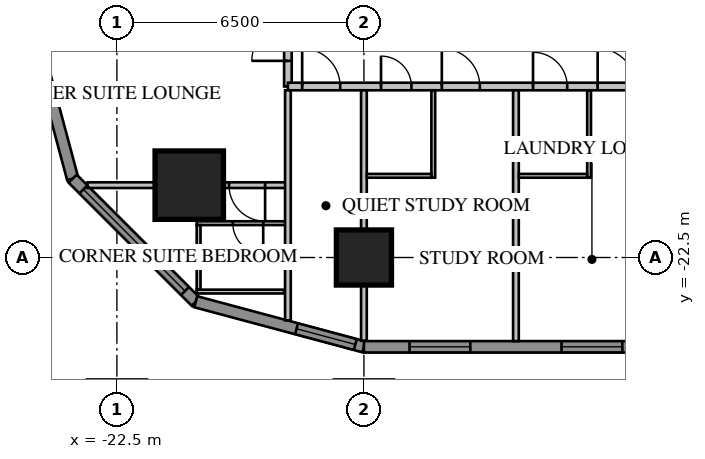
"""IFC4 building model, lengths in metres.
Left out: names, types, materials, properties, quantities, classifications, styles, units other than length and angle.
Written with IfcOpenShell. Run it as: python <this file> out.ifc"""

import sys

from ifc_helpers import new_model, si_unit, direction, frame, frame_2d, origin, origin_2d, place, context, subcontext, project, spatial, rectangle, extrude, element, fill, save


model = new_model("IFC4")
c1 = context("Model", 3, precision=1e-05, world=origin(), true_north=direction((0.0, 1.0)))
c2 = subcontext(c1, "Body", "Model", "MODEL_VIEW")
j1 = project(units=[si_unit("LENGTHUNIT", "METRE"), si_unit("PLANEANGLEUNIT", "RADIAN")], contexts=[c1])
p1 = place(None, origin())
s1 = spatial("IfcSite", under=j1, at=p1, CompositionType="ELEMENT")
p2 = place(p1, origin())
s2 = spatial("IfcBuilding", under=s1, at=p2, CompositionType="ELEMENT")
p3 = place(p2, frame((0.0, 0.0, 46.8)))
s3 = spatial("IfcBuildingStorey", under=s2, at=p3, CompositionType="ELEMENT", Elevation=46.8)
p4 = place(p3, frame((-20.596, -20.596, 0.0), z_axis=(0.0, 0.0, 1.0), x_axis=(1.0, 0.0, 0.0)))
e1 = element("IfcColumn", 1, at=p4, inside=s3, PredefinedType="COLUMN", context=c2, shape_type="SweptSolid", body=[
    extrude(rectangle(XDim=1.8, YDim=1.8, at=origin_2d()), origin(), (0.0, 0.0, 1.0), 3.85),
])
p5 = place(p3, frame((-16.0, -22.5, 0.0), z_axis=(0.0, 0.0, 1.0), x_axis=(1.0, 0.0, 0.0)))
e2 = element("IfcColumn", 2, at=p5, inside=s3, PredefinedType="COLUMN", context=c2, shape_type="SweptSolid", body=[
    extrude(rectangle(XDim=1.45, YDim=1.45, at=origin_2d()), origin(), (0.0, 0.0, 1.0), 3.85),
])
p6 = place(p3, frame((-24.85, -16.0, 0.0), z_axis=(0.0, 0.0, 1.0), x_axis=(0.258839972501, -0.965920218567, 0.0)))
e3 = element("IfcWall", 3, at=p6, inside=s3, PredefinedType="SOLIDWALL", context=c2, shape_type="SweptSolid", body=[
    extrude(rectangle(XDim=4.581, YDim=0.3, at=frame_2d((2.291, 0.0))), origin(), (0.0, 0.0, 1.0), 3.65),
])
p7 = place(p3, frame((-23.664, -20.425, 0.0), z_axis=(0.0, 0.0, 1.0), x_axis=(0.707106781187, -0.707106781187, 0.0)))
e4 = element("IfcWall", 4, at=p7, inside=s3, PredefinedType="SOLIDWALL", context=c2, shape_type="SweptSolid", body=[
    extrude(rectangle(XDim=4.581, YDim=0.3, at=frame_2d((2.291, 0.0))), origin(), (0.0, 0.0, 1.0), 3.65),
])
p8 = place(p7, frame((0.4, 0.0, 0.75)))
e5 = element("IfcOpeningElement", 5, at=p8, cuts=e4, PredefinedType="OPENING", context=c2, shape_type="SweptSolid", body=[
    extrude(rectangle(XDim=3.781, YDim=1.8, at=frame_2d((1.891, 0.9))), frame((0.0, 0.17, 0.0), z_axis=(0.0, -1.0, 0.0), x_axis=(1.0, 0.0, 0.0)), (0.0, 0.0, 1.0), 0.34),
])
p9 = place(p3, frame((-20.425, -23.664, 0.0), z_axis=(0.0, 0.0, 1.0), x_axis=(0.965920218567, -0.258839972501, 0.0)))
e6 = element("IfcWall", 6, at=p9, inside=s3, PredefinedType="SOLIDWALL", context=c2, shape_type="SweptSolid", body=[
    extrude(rectangle(XDim=4.581, YDim=0.3, at=frame_2d((2.291, 0.0))), origin(), (0.0, 0.0, 1.0), 3.65),
])
p10 = place(p9, frame((2.746, 0.0, 0.75)))
e7 = element("IfcOpeningElement", 7, at=p10, cuts=e6, PredefinedType="OPENING", context=c2, shape_type="SweptSolid", body=[
    extrude(rectangle(XDim=1.6, YDim=1.8, at=frame_2d((0.8, 0.9))), frame((0.0, 0.17, 0.0), z_axis=(0.0, -1.0, 0.0), x_axis=(1.0, 0.0, 0.0)), (0.0, 0.0, 1.0), 0.34),
])
p11 = place(p3, frame((-16.0, -24.85, 0.0), z_axis=(0.0, 0.0, 1.0), x_axis=(1.0, 0.0, 0.0)))
e8 = element("IfcWall", 8, at=p11, inside=s3, PredefinedType="SOLIDWALL", context=c2, shape_type="SweptSolid", body=[
    extrude(rectangle(XDim=32.0, YDim=0.3, at=frame_2d((16.0, 0.0))), origin(), (0.0, 0.0, 1.0), 3.65),
])
p12 = place(p11, frame((1.2, 0.0, 0.75)))
e9 = element("IfcOpeningElement", 9, at=p12, cuts=e8, PredefinedType="OPENING", context=c2, shape_type="SweptSolid", body=[
    extrude(rectangle(XDim=1.6, YDim=1.8, at=frame_2d((0.8, 0.9))), frame((0.0, 0.17, 0.0), z_axis=(0.0, -1.0, 0.0), x_axis=(1.0, 0.0, 0.0)), (0.0, 0.0, 1.0), 0.34),
])
p13 = place(p11, frame((5.2, 0.0, 0.75)))
e10 = element("IfcOpeningElement", 10, at=p13, cuts=e8, PredefinedType="OPENING", context=c2, shape_type="SweptSolid", body=[
    extrude(rectangle(XDim=1.6, YDim=1.8, at=frame_2d((0.8, 0.9))), frame((0.0, 0.17, 0.0), z_axis=(0.0, -1.0, 0.0), x_axis=(1.0, 0.0, 0.0)), (0.0, 0.0, 1.0), 0.34),
])
p14 = place(p11, frame((17.2, 0.0, 0.75)))
e11 = element("IfcOpeningElement", 11, at=p14, cuts=e8, PredefinedType="OPENING", context=c2, shape_type="SweptSolid", body=[
    extrude(rectangle(XDim=1.6, YDim=1.8, at=frame_2d((0.8, 0.9))), frame((0.0, 0.17, 0.0), z_axis=(0.0, -1.0, 0.0), x_axis=(1.0, 0.0, 0.0)), (0.0, 0.0, 1.0), 0.34),
])
p15 = place(p11, frame((21.2, 0.0, 0.75)))
e12 = element("IfcOpeningElement", 12, at=p15, cuts=e8, PredefinedType="OPENING", context=c2, shape_type="SweptSolid", body=[
    extrude(rectangle(XDim=1.6, YDim=1.8, at=frame_2d((0.8, 0.9))), frame((0.0, 0.17, 0.0), z_axis=(0.0, -1.0, 0.0), x_axis=(1.0, 0.0, 0.0)), (0.0, 0.0, 1.0), 0.34),
])
p16 = place(p11, frame((25.2, 0.0, 0.75)))
e13 = element("IfcOpeningElement", 13, at=p16, cuts=e8, PredefinedType="OPENING", context=c2, shape_type="SweptSolid", body=[
    extrude(rectangle(XDim=1.6, YDim=1.8, at=frame_2d((0.8, 0.9))), frame((0.0, 0.17, 0.0), z_axis=(0.0, -1.0, 0.0), x_axis=(1.0, 0.0, 0.0)), (0.0, 0.0, 1.0), 0.34),
])
p17 = place(p11, frame((29.2, 0.0, 0.75)))
e14 = element("IfcOpeningElement", 14, at=p17, cuts=e8, PredefinedType="OPENING", context=c2, shape_type="SweptSolid", body=[
    extrude(rectangle(XDim=1.6, YDim=1.8, at=frame_2d((0.8, 0.9))), frame((0.0, 0.17, 0.0), z_axis=(0.0, -1.0, 0.0), x_axis=(1.0, 0.0, 0.0)), (0.0, 0.0, 1.0), 0.34),
])
p18 = place(p11, frame((8.8, 0.0, 0.75)))
e15 = element("IfcOpeningElement", 15, at=p18, cuts=e8, PredefinedType="OPENING", context=c2, shape_type="SweptSolid", body=[
    extrude(rectangle(XDim=2.4, YDim=1.8, at=frame_2d((1.2, 0.9))), frame((0.0, 0.17, 0.0), z_axis=(0.0, -1.0, 0.0), x_axis=(1.0, 0.0, 0.0)), (0.0, 0.0, 1.0), 0.34),
])
p19 = place(p11, frame((13.812, 0.0, 0.0)))
e16 = element("IfcOpeningElement", 16, at=p19, cuts=e8, PredefinedType="OPENING", context=c2, shape_type="SweptSolid", body=[
    extrude(rectangle(XDim=1.0, YDim=2.4, at=frame_2d((0.5, 1.2))), frame((0.0, 0.17, 0.0), z_axis=(0.0, -1.0, 0.0), x_axis=(1.0, 0.0, 0.0)), (0.0, 0.0, 1.0), 0.34),
])
p20 = place(p3, frame((-18.0, 18.0, 0.0), z_axis=(0.0, 0.0, 1.0), x_axis=(0.0, -1.0, 0.0)))
e17 = element("IfcWall", 17, at=p20, inside=s3, PredefinedType="PARTITIONING", context=c2, shape_type="SweptSolid", body=[
    extrude(rectangle(XDim=36.0, YDim=0.2, at=frame_2d((18.0, 0.0))), origin(), (0.0, 0.0, 1.0), 3.65),
])
p21 = place(p20, frame((0.375, 0.0, 0.0)))
e18 = element("IfcOpeningElement", 18, at=p21, cuts=e17, PredefinedType="OPENING", context=c2, shape_type="SweptSolid", body=[
    extrude(rectangle(XDim=1.0, YDim=2.1, at=frame_2d((0.5, 1.05))), frame((0.0, 0.12, 0.0), z_axis=(0.0, -1.0, 0.0), x_axis=(1.0, 0.0, 0.0)), (0.0, 0.0, 1.0), 0.24),
])
p22 = place(p20, frame((2.375, 0.0, 0.0)))
e19 = element("IfcOpeningElement", 19, at=p22, cuts=e17, PredefinedType="OPENING", context=c2, shape_type="SweptSolid", body=[
    extrude(rectangle(XDim=0.95, YDim=2.1, at=frame_2d((0.475, 1.05))), frame((0.0, 0.12, 0.0), z_axis=(0.0, -1.0, 0.0), x_axis=(1.0, 0.0, 0.0)), (0.0, 0.0, 1.0), 0.24),
])
p23 = place(p20, frame((7.95, 0.0, 0.0)))
e20 = element("IfcOpeningElement", 20, at=p23, cuts=e17, PredefinedType="OPENING", context=c2, shape_type="SweptSolid", body=[
    extrude(rectangle(XDim=0.95, YDim=2.1, at=frame_2d((0.475, 1.05))), frame((0.0, 0.12, 0.0), z_axis=(0.0, -1.0, 0.0), x_axis=(1.0, 0.0, 0.0)), (0.0, 0.0, 1.0), 0.24),
])
p24 = place(p20, frame((18.375, 0.0, 0.0)))
e21 = element("IfcOpeningElement", 21, at=p24, cuts=e17, PredefinedType="OPENING", context=c2, shape_type="SweptSolid", body=[
    extrude(rectangle(XDim=0.95, YDim=2.1, at=frame_2d((0.475, 1.05))), frame((0.0, 0.12, 0.0), z_axis=(0.0, -1.0, 0.0), x_axis=(1.0, 0.0, 0.0)), (0.0, 0.0, 1.0), 0.24),
])
p25 = place(p20, frame((23.95, 0.0, 0.0)))
e22 = element("IfcOpeningElement", 22, at=p25, cuts=e17, PredefinedType="OPENING", context=c2, shape_type="SweptSolid", body=[
    extrude(rectangle(XDim=0.95, YDim=2.1, at=frame_2d((0.475, 1.05))), frame((0.0, 0.12, 0.0), z_axis=(0.0, -1.0, 0.0), x_axis=(1.0, 0.0, 0.0)), (0.0, 0.0, 1.0), 0.24),
])
p26 = place(p20, frame((26.375, 0.0, 0.0)))
e23 = element("IfcOpeningElement", 23, at=p26, cuts=e17, PredefinedType="OPENING", context=c2, shape_type="SweptSolid", body=[
    extrude(rectangle(XDim=0.95, YDim=2.1, at=frame_2d((0.475, 1.05))), frame((0.0, 0.12, 0.0), z_axis=(0.0, -1.0, 0.0), x_axis=(1.0, 0.0, 0.0)), (0.0, 0.0, 1.0), 0.24),
])
p27 = place(p20, frame((31.95, 0.0, 0.0)))
e24 = element("IfcOpeningElement", 24, at=p27, cuts=e17, PredefinedType="OPENING", context=c2, shape_type="SweptSolid", body=[
    extrude(rectangle(XDim=0.95, YDim=2.1, at=frame_2d((0.475, 1.05))), frame((0.0, 0.12, 0.0), z_axis=(0.0, -1.0, 0.0), x_axis=(1.0, 0.0, 0.0)), (0.0, 0.0, 1.0), 0.24),
])
p28 = place(p20, frame((34.375, 0.0, 0.0)))
e25 = element("IfcOpeningElement", 25, at=p28, cuts=e17, PredefinedType="OPENING", context=c2, shape_type="SweptSolid", body=[
    extrude(rectangle(XDim=0.95, YDim=2.1, at=frame_2d((0.475, 1.05))), frame((0.0, 0.12, 0.0), z_axis=(0.0, -1.0, 0.0), x_axis=(1.0, 0.0, 0.0)), (0.0, 0.0, 1.0), 0.24),
])
p29 = place(p20, frame((11.2, 0.0, 0.0)))
e26 = element("IfcOpeningElement", 26, at=p29, cuts=e17, PredefinedType="OPENING", context=c2, shape_type="SweptSolid", body=[
    extrude(rectangle(XDim=1.0, YDim=2.1, at=frame_2d((0.5, 1.05))), frame((0.0, 0.12, 0.0), z_axis=(0.0, -1.0, 0.0), x_axis=(1.0, 0.0, 0.0)), (0.0, 0.0, 1.0), 0.24),
])
p30 = place(p3, frame((-18.065, -21.596, 0.0), z_axis=(0.0, 0.0, 1.0), x_axis=(-1.0, 0.0, 0.0)))
e27 = element("IfcWall", 27, at=p30, inside=s3, PredefinedType="PARTITIONING", context=c2, shape_type="SweptSolid", body=[
    extrude(rectangle(XDim=2.335, YDim=0.1, at=frame_2d((1.167, 0.0))), origin(), (0.0, 0.0, 1.0), 3.65),
])
p31 = place(p30, frame((0.585, 0.0, 0.0)))
e28 = element("IfcOpeningElement", 28, at=p31, cuts=e27, PredefinedType="OPENING", context=c2, shape_type="SweptSolid", body=[
    extrude(rectangle(XDim=0.8, YDim=2.1, at=frame_2d((0.4, 1.05))), frame((0.0, 0.07, 0.0), z_axis=(0.0, -1.0, 0.0), x_axis=(1.0, 0.0, 0.0)), (0.0, 0.0, 1.0), 0.14),
])
p32 = place(p3, frame((-20.35, -21.646, 0.0), z_axis=(0.0, 0.0, 1.0), x_axis=(0.0, -1.0, 0.0)))
e29 = element("IfcWall", 29, at=p32, inside=s3, PredefinedType="PARTITIONING", context=c2, shape_type="SweptSolid", body=[
    extrude(rectangle(XDim=1.7, YDim=0.1, at=frame_2d((0.85, 0.0))), origin(), (0.0, 0.0, 1.0), 3.65),
])
p33 = place(p3, frame((-18.1, -23.396, 0.0), z_axis=(0.0, 0.0, 1.0), x_axis=(-1.0, 0.0, 0.0)))
e30 = element("IfcWall", 30, at=p33, inside=s3, PredefinedType="PARTITIONING", context=c2, shape_type="SweptSolid", body=[
    extrude(rectangle(XDim=2.3, YDim=0.1, at=frame_2d((1.15, 0.0))), origin(), (0.0, 0.0, 1.0), 3.65),
])
p34 = place(p3, frame((-18.065, -20.596, 0.0), z_axis=(0.0, 0.0, 1.0), x_axis=(-1.0, 0.0, 0.0)))
e31 = element("IfcWall", 31, at=p34, inside=s3, PredefinedType="PARTITIONING", context=c2, shape_type="SweptSolid", body=[
    extrude(rectangle(XDim=5.209, YDim=0.15, at=frame_2d((2.604, 0.0))), origin(), (0.0, 0.0, 1.0), 3.65),
])
p35 = place(p34, frame((0.535, 0.0, 0.0)))
e32 = element("IfcOpeningElement", 32, at=p35, cuts=e31, PredefinedType="OPENING", context=c2, shape_type="SweptSolid", body=[
    extrude(rectangle(XDim=0.95, YDim=2.1, at=frame_2d((0.475, 1.05))), frame((0.0, 0.095, 0.0), z_axis=(0.0, -1.0, 0.0), x_axis=(1.0, 0.0, 0.0)), (0.0, 0.0, 1.0), 0.19),
])
p36 = place(p3, frame((-18.0, -18.0, 0.0), z_axis=(0.0, 0.0, 1.0), x_axis=(1.0, 0.0, 0.0)))
e33 = element("IfcWall", 33, at=p36, inside=s3, PredefinedType="PARTITIONING", context=c2, shape_type="SweptSolid", body=[
    extrude(rectangle(XDim=36.0, YDim=0.2, at=frame_2d((18.0, 0.0))), origin(), (0.0, 0.0, 1.0), 3.65),
])
p37 = place(p36, frame((0.375, 0.0, 0.0)))
e34 = element("IfcOpeningElement", 34, at=p37, cuts=e33, PredefinedType="OPENING", context=c2, shape_type="SweptSolid", body=[
    extrude(rectangle(XDim=1.0, YDim=2.1, at=frame_2d((0.5, 1.05))), frame((0.0, 0.12, 0.0), z_axis=(0.0, -1.0, 0.0), x_axis=(1.0, 0.0, 0.0)), (0.0, 0.0, 1.0), 0.24),
])
p38 = place(p36, frame((2.45, 0.0, 0.0)))
e35 = element("IfcOpeningElement", 35, at=p38, cuts=e33, PredefinedType="OPENING", context=c2, shape_type="SweptSolid", body=[
    extrude(rectangle(XDim=0.8, YDim=2.1, at=frame_2d((0.4, 1.05))), frame((0.0, 0.12, 0.0), z_axis=(0.0, -1.0, 0.0), x_axis=(1.0, 0.0, 0.0)), (0.0, 0.0, 1.0), 0.24),
])
p39 = place(p36, frame((4.05, 0.0, 0.0)))
e36 = element("IfcOpeningElement", 36, at=p39, cuts=e33, PredefinedType="OPENING", context=c2, shape_type="SweptSolid", body=[
    extrude(rectangle(XDim=1.0, YDim=2.1, at=frame_2d((0.5, 1.05))), frame((0.0, 0.12, 0.0), z_axis=(0.0, -1.0, 0.0), x_axis=(1.0, 0.0, 0.0)), (0.0, 0.0, 1.0), 0.24),
])
p40 = place(p36, frame((6.45, 0.0, 0.0)))
e37 = element("IfcOpeningElement", 37, at=p40, cuts=e33, PredefinedType="OPENING", context=c2, shape_type="SweptSolid", body=[
    extrude(rectangle(XDim=0.9, YDim=2.1, at=frame_2d((0.45, 1.05))), frame((0.0, 0.12, 0.0), z_axis=(0.0, -1.0, 0.0), x_axis=(1.0, 0.0, 0.0)), (0.0, 0.0, 1.0), 0.24),
])
p41 = place(p36, frame((8.15, 0.0, 0.0)))
e38 = element("IfcOpeningElement", 38, at=p41, cuts=e33, PredefinedType="OPENING", context=c2, shape_type="SweptSolid", body=[
    extrude(rectangle(XDim=1.0, YDim=2.1, at=frame_2d((0.5, 1.05))), frame((0.0, 0.12, 0.0), z_axis=(0.0, -1.0, 0.0), x_axis=(1.0, 0.0, 0.0)), (0.0, 0.0, 1.0), 0.24),
])
p42 = place(p36, frame((19.95, 0.0, 0.0)))
e39 = element("IfcOpeningElement", 39, at=p42, cuts=e33, PredefinedType="OPENING", context=c2, shape_type="SweptSolid", body=[
    extrude(rectangle(XDim=0.95, YDim=2.1, at=frame_2d((0.475, 1.05))), frame((0.0, 0.12, 0.0), z_axis=(0.0, -1.0, 0.0), x_axis=(1.0, 0.0, 0.0)), (0.0, 0.0, 1.0), 0.24),
])
p43 = place(p36, frame((23.95, 0.0, 0.0)))
e40 = element("IfcOpeningElement", 40, at=p43, cuts=e33, PredefinedType="OPENING", context=c2, shape_type="SweptSolid", body=[
    extrude(rectangle(XDim=0.95, YDim=2.1, at=frame_2d((0.475, 1.05))), frame((0.0, 0.12, 0.0), z_axis=(0.0, -1.0, 0.0), x_axis=(1.0, 0.0, 0.0)), (0.0, 0.0, 1.0), 0.24),
])
p44 = place(p36, frame((27.95, 0.0, 0.0)))
e41 = element("IfcOpeningElement", 41, at=p44, cuts=e33, PredefinedType="OPENING", context=c2, shape_type="SweptSolid", body=[
    extrude(rectangle(XDim=0.95, YDim=2.1, at=frame_2d((0.475, 1.05))), frame((0.0, 0.12, 0.0), z_axis=(0.0, -1.0, 0.0), x_axis=(1.0, 0.0, 0.0)), (0.0, 0.0, 1.0), 0.24),
])
p45 = place(p36, frame((31.95, 0.0, 0.0)))
e42 = element("IfcOpeningElement", 42, at=p45, cuts=e33, PredefinedType="OPENING", context=c2, shape_type="SweptSolid", body=[
    extrude(rectangle(XDim=0.95, YDim=2.1, at=frame_2d((0.475, 1.05))), frame((0.0, 0.12, 0.0), z_axis=(0.0, -1.0, 0.0), x_axis=(1.0, 0.0, 0.0)), (0.0, 0.0, 1.0), 0.24),
])
p46 = place(p36, frame((34.375, 0.0, 0.0)))
e43 = element("IfcOpeningElement", 43, at=p46, cuts=e33, PredefinedType="OPENING", context=c2, shape_type="SweptSolid", body=[
    extrude(rectangle(XDim=0.95, YDim=2.1, at=frame_2d((0.475, 1.05))), frame((0.0, 0.12, 0.0), z_axis=(0.0, -1.0, 0.0), x_axis=(1.0, 0.0, 0.0)), (0.0, 0.0, 1.0), 0.24),
])
p47 = place(p36, frame((11.2, 0.0, 0.0)))
e44 = element("IfcOpeningElement", 44, at=p47, cuts=e33, PredefinedType="OPENING", context=c2, shape_type="SweptSolid", body=[
    extrude(rectangle(XDim=1.0, YDim=2.1, at=frame_2d((0.5, 1.05))), frame((0.0, 0.12, 0.0), z_axis=(0.0, -1.0, 0.0), x_axis=(1.0, 0.0, 0.0)), (0.0, 0.0, 1.0), 0.24),
])
p48 = place(p3, frame((-18.0, -18.1, 0.0), z_axis=(0.0, 0.0, 1.0), x_axis=(0.0, -1.0, 0.0)))
e45 = element("IfcWall", 45, at=p48, inside=s3, PredefinedType="PARTITIONING", context=c2, shape_type="SweptSolid", body=[
    extrude(rectangle(XDim=6.053, YDim=0.15, at=frame_2d((3.027, 0.0))), origin(), (0.0, 0.0, 1.0), 3.65),
])
p49 = place(p3, frame((-16.0, -18.1, 0.0), z_axis=(0.0, 0.0, 1.0), x_axis=(0.0, -1.0, 0.0)))
e46 = element("IfcWall", 46, at=p49, inside=s3, PredefinedType="PARTITIONING", context=c2, shape_type="SweptSolid", body=[
    extrude(rectangle(XDim=6.589, YDim=0.15, at=frame_2d((3.295, 0.0))), origin(), (0.0, 0.0, 1.0), 3.65),
])
p50 = place(p3, frame((-12.0, -18.1, 0.0), z_axis=(0.0, 0.0, 1.0), x_axis=(0.0, -1.0, 0.0)))
e47 = element("IfcWall", 47, at=p50, inside=s3, PredefinedType="PARTITIONING", context=c2, shape_type="SweptSolid", body=[
    extrude(rectangle(XDim=6.6, YDim=0.15, at=frame_2d((3.3, 0.0))), origin(), (0.0, 0.0, 1.0), 3.65),
])
p51 = place(p3, frame((-14.175, -18.1, 0.0), z_axis=(0.0, 0.0, 1.0), x_axis=(0.0, -1.0, 0.0)))
e48 = element("IfcWall", 48, at=p51, inside=s3, PredefinedType="PARTITIONING", context=c2, shape_type="SweptSolid", body=[
    extrude(rectangle(XDim=2.3, YDim=0.1, at=frame_2d((1.15, 0.0))), origin(), (0.0, 0.0, 1.0), 3.65),
])
p52 = place(p3, frame((-15.925, -20.35, 0.0), z_axis=(0.0, 0.0, 1.0), x_axis=(1.0, 0.0, 0.0)))
e49 = element("IfcWall", 49, at=p52, inside=s3, PredefinedType="PARTITIONING", context=c2, shape_type="SweptSolid", body=[
    extrude(rectangle(XDim=1.7, YDim=0.1, at=frame_2d((0.85, 0.0))), origin(), (0.0, 0.0, 1.0), 3.65),
])
p53 = place(p3, frame((-10.075, -18.1, 0.0), z_axis=(0.0, 0.0, 1.0), x_axis=(0.0, -1.0, 0.0)))
e50 = element("IfcWall", 50, at=p53, inside=s3, PredefinedType="PARTITIONING", context=c2, shape_type="SweptSolid", body=[
    extrude(rectangle(XDim=2.3, YDim=0.1, at=frame_2d((1.15, 0.0))), origin(), (0.0, 0.0, 1.0), 3.65),
])
p54 = place(p3, frame((-11.925, -20.35, 0.0), z_axis=(0.0, 0.0, 1.0), x_axis=(1.0, 0.0, 0.0)))
e51 = element("IfcWall", 51, at=p54, inside=s3, PredefinedType="PARTITIONING", context=c2, shape_type="SweptSolid", body=[
    extrude(rectangle(XDim=1.8, YDim=0.1, at=frame_2d((0.9, 0.0))), origin(), (0.0, 0.0, 1.0), 3.65),
])
p55 = place(p8, origin())
e52 = element("IfcWindow", 52, at=p55, inside=s3, PartitioningType="SINGLE_PANEL", PredefinedType="WINDOW", context=c2, shape_type="SweptSolid", body=[
    extrude(rectangle(XDim=3.781, YDim=1.8, at=frame_2d((1.891, 0.9))), frame((0.0, 0.03, 0.0), z_axis=(0.0, -1.0, 0.0), x_axis=(1.0, 0.0, 0.0)), (0.0, 0.0, 1.0), 0.06),
])
fill(e5, e52)
p56 = place(p10, origin())
e53 = element("IfcWindow", 53, at=p56, inside=s3, PartitioningType="SINGLE_PANEL", PredefinedType="WINDOW", context=c2, shape_type="SweptSolid", body=[
    extrude(rectangle(XDim=1.6, YDim=1.8, at=frame_2d((0.8, 0.9))), frame((0.0, 0.03, 0.0), z_axis=(0.0, -1.0, 0.0), x_axis=(1.0, 0.0, 0.0)), (0.0, 0.0, 1.0), 0.06),
])
fill(e7, e53)
p57 = place(p12, origin())
e54 = element("IfcWindow", 54, at=p57, inside=s3, PartitioningType="SINGLE_PANEL", PredefinedType="WINDOW", context=c2, shape_type="SweptSolid", body=[
    extrude(rectangle(XDim=1.6, YDim=1.8, at=frame_2d((0.8, 0.9))), frame((0.0, 0.03, 0.0), z_axis=(0.0, -1.0, 0.0), x_axis=(1.0, 0.0, 0.0)), (0.0, 0.0, 1.0), 0.06),
])
fill(e9, e54)
p58 = place(p13, origin())
e55 = element("IfcWindow", 55, at=p58, inside=s3, PartitioningType="SINGLE_PANEL", PredefinedType="WINDOW", context=c2, shape_type="SweptSolid", body=[
    extrude(rectangle(XDim=1.6, YDim=1.8, at=frame_2d((0.8, 0.9))), frame((0.0, 0.03, 0.0), z_axis=(0.0, -1.0, 0.0), x_axis=(1.0, 0.0, 0.0)), (0.0, 0.0, 1.0), 0.06),
])
fill(e10, e55)
p59 = place(p28, origin())
e56 = element("IfcDoor", 56, at=p59, inside=s3, OperationType="SINGLE_SWING_RIGHT", PredefinedType="DOOR", context=c2, shape_type="SweptSolid", body=[
    extrude(rectangle(XDim=0.95, YDim=2.1, at=frame_2d((0.475, 1.05))), frame((0.0, 0.025, 0.0), z_axis=(0.0, -1.0, 0.0), x_axis=(1.0, 0.0, 0.0)), (0.0, 0.0, 1.0), 0.05),
])
fill(e25, e56)
p60 = place(p31, origin())
e57 = element("IfcDoor", 57, at=p60, inside=s3, OperationType="SINGLE_SWING_LEFT", PredefinedType="DOOR", context=c2, shape_type="SweptSolid", body=[
    extrude(rectangle(XDim=0.8, YDim=2.1, at=frame_2d((0.4, 1.05))), frame((0.0, 0.025, 0.0), z_axis=(0.0, -1.0, 0.0), x_axis=(1.0, 0.0, 0.0)), (0.0, 0.0, 1.0), 0.05),
])
fill(e28, e57)
p61 = place(p35, origin())
e58 = element("IfcDoor", 58, at=p61, inside=s3, OperationType="SINGLE_SWING_LEFT", PredefinedType="DOOR", context=c2, shape_type="SweptSolid", body=[
    extrude(rectangle(XDim=0.95, YDim=2.1, at=frame_2d((0.475, 1.05))), frame((0.0, 0.025, 0.0), z_axis=(0.0, -1.0, 0.0), x_axis=(1.0, 0.0, 0.0)), (0.0, 0.0, 1.0), 0.05),
])
fill(e32, e58)
p62 = place(p37, origin())
e59 = element("IfcDoor", 59, at=p62, inside=s3, OperationType="SINGLE_SWING_LEFT", PredefinedType="DOOR", context=c2, shape_type="SweptSolid", body=[
    extrude(rectangle(XDim=1.0, YDim=2.1, at=frame_2d((0.5, 1.05))), frame((0.0, 0.025, 0.0), z_axis=(0.0, -1.0, 0.0), x_axis=(1.0, 0.0, 0.0)), (0.0, 0.0, 1.0), 0.05),
])
fill(e34, e59)
p63 = place(p38, origin())
e60 = element("IfcDoor", 60, at=p63, inside=s3, OperationType="SINGLE_SWING_LEFT", PredefinedType="DOOR", context=c2, shape_type="SweptSolid", body=[
    extrude(rectangle(XDim=0.8, YDim=2.1, at=frame_2d((0.4, 1.05))), frame((0.0, 0.025, 0.0), z_axis=(0.0, -1.0, 0.0), x_axis=(1.0, 0.0, 0.0)), (0.0, 0.0, 1.0), 0.05),
])
fill(e35, e60)
p64 = place(p39, origin())
e61 = element("IfcDoor", 61, at=p64, inside=s3, OperationType="SINGLE_SWING_LEFT", PredefinedType="DOOR", context=c2, shape_type="SweptSolid", body=[
    extrude(rectangle(XDim=1.0, YDim=2.1, at=frame_2d((0.5, 1.05))), frame((0.0, 0.025, 0.0), z_axis=(0.0, -1.0, 0.0), x_axis=(1.0, 0.0, 0.0)), (0.0, 0.0, 1.0), 0.05),
])
fill(e36, e61)
p65 = place(p40, origin())
e62 = element("IfcDoor", 62, at=p65, inside=s3, OperationType="SINGLE_SWING_LEFT", PredefinedType="DOOR", context=c2, shape_type="SweptSolid", body=[
    extrude(rectangle(XDim=0.9, YDim=2.1, at=frame_2d((0.45, 1.05))), frame((0.0, 0.025, 0.0), z_axis=(0.0, -1.0, 0.0), x_axis=(1.0, 0.0, 0.0)), (0.0, 0.0, 1.0), 0.05),
])
fill(e37, e62)
p66 = place(p41, origin())
e63 = element("IfcDoor", 63, at=p66, inside=s3, OperationType="SINGLE_SWING_LEFT", PredefinedType="DOOR", context=c2, shape_type="SweptSolid", body=[
    extrude(rectangle(XDim=1.0, YDim=2.1, at=frame_2d((0.5, 1.05))), frame((0.0, 0.025, 0.0), z_axis=(0.0, -1.0, 0.0), x_axis=(1.0, 0.0, 0.0)), (0.0, 0.0, 1.0), 0.05),
])
fill(e38, e63)
save(model, sys.argv[1])
